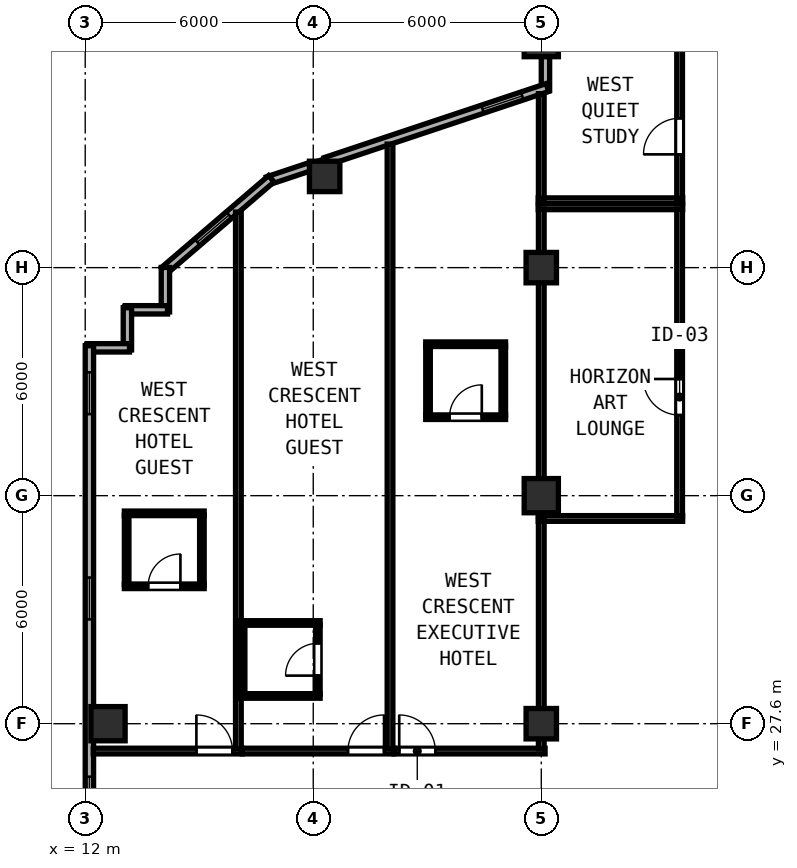
"""IFC4 building model, lengths in metres.
Left out: names, types, materials, properties, quantities, classifications, styles, units other than length and angle.
Written with IfcOpenShell. Run it as: python <this file> out.ifc"""

import sys

from ifc_helpers import new_model, si_unit, direction, frame, frame_2d, origin, origin_2d, place, context, subcontext, project, spatial, rectangle, hollow_rectangle, extrude, element, fill, save


model = new_model("IFC4")
c1 = context("Model", 3, precision=1e-05, world=origin(), true_north=direction((0.0, 1.0)))
c2 = subcontext(c1, "Body", "Model", "MODEL_VIEW")
j1 = project(units=[si_unit("LENGTHUNIT", "METRE"), si_unit("PLANEANGLEUNIT", "RADIAN")], contexts=[c1])
p1 = place(None, origin())
s1 = spatial("IfcSite", under=j1, at=p1, CompositionType="ELEMENT")
p2 = place(p1, origin())
s2 = spatial("IfcBuilding", under=s1, at=p2, CompositionType="ELEMENT")
p3 = place(p2, frame((0.0, 0.0, 215.4)))
s3 = spatial("IfcBuildingStorey", under=s2, at=p3, CompositionType="ELEMENT", Elevation=215.4)
for number, where, z_axis, x_axis in (
    (1, (24.0, 33.6, 0.0), (0.0, 0.0, 1.0), (1.0, 0.0, 0.0)),
    (2, (24.0, 45.6, 0.0), (0.0, 0.0, 1.0), (1.0, 0.0, 0.0)),
    (3, (12.6, 27.6, 0.0), (0.0, 0.0, 1.0), (1.0, 0.0, 0.0)),
):
    element("IfcColumn", number, at=place(p3, frame(where, z_axis=z_axis, x_axis=x_axis)), inside=s3, PredefinedType="COLUMN", context=c2, shape_type="SweptSolid", body=[
        extrude(hollow_rectangle(XDim=0.9, YDim=0.9, WallThickness=0.034, at=origin_2d()), origin(), (0.0, 0.0, 1.0), 3.8),
    ])
for number, where, z_axis, x_axis in (
    (4, (24.0, 27.6, 0.0), (0.0, 0.0, 1.0), (1.0, 0.0, 0.0)),
    (5, (24.0, 39.6, 0.0), (0.0, 0.0, 1.0), (1.0, 0.0, 0.0)),
    (6, (18.3, 42.0, 0.0), (0.0, 0.0, 1.0), (1.0, 0.0, 0.0)),
):
    element("IfcColumn", number, at=place(p3, frame(where, z_axis=z_axis, x_axis=x_axis)), inside=s3, PredefinedType="COLUMN", context=c2, shape_type="SweptSolid", body=[
        extrude(hollow_rectangle(XDim=0.8, YDim=0.8, WallThickness=0.03, at=origin_2d()), origin(), (0.0, 0.0, 1.0), 3.8),
    ])
p4 = place(p3, frame((24.11, 45.158, 0.0), z_axis=(0.0, 0.0, 1.0), x_axis=(0.0, -1.0, 0.0)))
e7 = element("IfcWall", 7, at=p4, inside=s3, PredefinedType="SOLIDWALL", context=c2, shape_type="SweptSolid", body=[
    extrude(rectangle(XDim=0.892, YDim=0.22, at=frame_2d((0.446, 0.0))), origin(), (0.0, 0.0, 1.0), 3.215),
])
p5 = place(p3, frame((24.162, 44.338, 0.0), z_axis=(0.0, 0.0, 1.0), x_axis=(-0.948687265055, -0.316215864755, 0.0)))
e8 = element("IfcWall", 8, at=p5, inside=s3, PredefinedType="SOLIDWALL", context=c2, shape_type="SweptSolid", body=[
    extrude(rectangle(XDim=6.154, YDim=0.22, at=frame_2d((3.077, 0.0))), origin(), (0.0, 0.0, 1.0), 3.215),
])
p6 = place(p5, frame((0.7, 0.0, 0.85)))
e9 = element("IfcOpeningElement", 9, at=p6, cuts=e8, PredefinedType="OPENING", context=c2, shape_type="SweptSolid", body=[
    extrude(rectangle(XDim=1.1, YDim=1.75, at=frame_2d((0.55, 0.875))), frame((0.0, 0.12, 0.0), z_axis=(0.0, -1.0, 0.0), x_axis=(1.0, 0.0, 0.0)), (0.0, 0.0, 1.0), 0.24),
])
p7 = place(p3, frame((17.908, 42.253, 0.0), z_axis=(0.0, 0.0, 1.0), x_axis=(-0.948662335685, -0.316290646166, 0.0)))
e10 = element("IfcWall", 10, at=p7, inside=s3, PredefinedType="SOLIDWALL", context=c2, shape_type="SweptSolid", body=[
    extrude(rectangle(XDim=1.165, YDim=0.22, at=frame_2d((0.583, 0.0))), origin(), (0.0, 0.0, 1.0), 3.62),
])
p8 = place(p3, frame((16.897, 41.938, 0.0), z_axis=(0.0, 0.0, 1.0), x_axis=(-0.759279729622, -0.650764390686, 0.0)))
e11 = element("IfcWall", 11, at=p8, inside=s3, PredefinedType="SOLIDWALL", context=c2, shape_type="SweptSolid", body=[
    extrude(rectangle(XDim=3.726, YDim=0.22, at=frame_2d((1.863, 0.0))), origin(), (0.0, 0.0, 1.0), 3.62),
])
p9 = place(p8, frame((1.464, 0.0, 0.85)))
e12 = element("IfcOpeningElement", 12, at=p9, cuts=e11, PredefinedType="OPENING", context=c2, shape_type="SweptSolid", body=[
    extrude(rectangle(XDim=1.1, YDim=1.75, at=frame_2d((0.55, 0.875))), frame((0.0, 0.12, 0.0), z_axis=(0.0, -1.0, 0.0), x_axis=(1.0, 0.0, 0.0)), (0.0, 0.0, 1.0), 0.24),
])
p10 = place(p3, frame((14.11, 39.604, 0.0), z_axis=(0.0, 0.0, 1.0), x_axis=(0.0, -1.0, 0.0)))
e13 = element("IfcWall", 13, at=p10, inside=s3, PredefinedType="SOLIDWALL", context=c2, shape_type="SweptSolid", body=[
    extrude(rectangle(XDim=1.169, YDim=0.22, at=frame_2d((0.585, 0.0))), origin(), (0.0, 0.0, 1.0), 3.62),
])
p11 = place(p3, frame((14.165, 38.49, 0.0), z_axis=(0.0, 0.0, 1.0), x_axis=(-1.0, 0.0, 0.0)))
e14 = element("IfcWall", 14, at=p11, inside=s3, PredefinedType="SOLIDWALL", context=c2, shape_type="SweptSolid", body=[
    extrude(rectangle(XDim=1.11, YDim=0.22, at=frame_2d((0.555, 0.0))), origin(), (0.0, 0.0, 1.0), 3.62),
])
p12 = place(p3, frame((13.11, 38.545, 0.0), z_axis=(0.0, 0.0, 1.0), x_axis=(0.0, -1.0, 0.0)))
e15 = element("IfcWall", 15, at=p12, inside=s3, PredefinedType="SOLIDWALL", context=c2, shape_type="SweptSolid", body=[
    extrude(rectangle(XDim=1.11, YDim=0.22, at=frame_2d((0.555, 0.0))), origin(), (0.0, 0.0, 1.0), 3.62),
])
p13 = place(p3, frame((13.165, 37.49, 0.0), z_axis=(0.0, 0.0, 1.0), x_axis=(-1.0, 0.0, 0.0)))
e16 = element("IfcWall", 16, at=p13, inside=s3, PredefinedType="SOLIDWALL", context=c2, shape_type="SweptSolid", body=[
    extrude(rectangle(XDim=1.11, YDim=0.22, at=frame_2d((0.555, 0.0))), origin(), (0.0, 0.0, 1.0), 3.62),
])
p14 = place(p3, frame((12.11, 37.545, 0.0), z_axis=(0.0, 0.0, 1.0), x_axis=(0.0, -1.0, 0.0)))
e17 = element("IfcWall", 17, at=p14, inside=s3, PredefinedType="SOLIDWALL", context=c2, shape_type="SweptSolid", body=[
    extrude(rectangle(XDim=21.145, YDim=0.22, at=frame_2d((10.573, 0.0))), origin(), (0.0, 0.0, 1.0), 3.62),
])
p15 = place(p14, frame((0.7, 0.0, 0.85)))
e18 = element("IfcOpeningElement", 18, at=p15, cuts=e17, PredefinedType="OPENING", context=c2, shape_type="SweptSolid", body=[
    extrude(rectangle(XDim=1.1, YDim=1.75, at=frame_2d((0.55, 0.875))), frame((0.0, 0.12, 0.0), z_axis=(0.0, -1.0, 0.0), x_axis=(1.0, 0.0, 0.0)), (0.0, 0.0, 1.0), 0.24),
])
p16 = place(p14, frame((6.1, 0.0, 0.85)))
e19 = element("IfcOpeningElement", 19, at=p16, cuts=e17, PredefinedType="OPENING", context=c2, shape_type="SweptSolid", body=[
    extrude(rectangle(XDim=1.1, YDim=1.75, at=frame_2d((0.55, 0.875))), frame((0.0, 0.12, 0.0), z_axis=(0.0, -1.0, 0.0), x_axis=(1.0, 0.0, 0.0)), (0.0, 0.0, 1.0), 0.24),
])
p17 = place(p14, frame((11.34, 0.0, 0.85)))
e20 = element("IfcOpeningElement", 20, at=p17, cuts=e17, PredefinedType="OPENING", context=c2, shape_type="SweptSolid", body=[
    extrude(rectangle(XDim=1.1, YDim=1.75, at=frame_2d((0.55, 0.875))), frame((0.0, 0.12, 0.0), z_axis=(0.0, -1.0, 0.0), x_axis=(1.0, 0.0, 0.0)), (0.0, 0.0, 1.0), 0.24),
])
p18 = place(p14, frame((16.9, 0.0, 0.85)))
e21 = element("IfcOpeningElement", 21, at=p18, cuts=e17, PredefinedType="OPENING", context=c2, shape_type="SweptSolid", body=[
    extrude(rectangle(XDim=1.1, YDim=1.75, at=frame_2d((0.55, 0.875))), frame((0.0, 0.12, 0.0), z_axis=(0.0, -1.0, 0.0), x_axis=(1.0, 0.0, 0.0)), (0.0, 0.0, 1.0), 0.24),
])
for number, where, z_axis, x_axis in (
    (22, (23.92, 41.2, 0.0), (0.0, 0.0, 1.0), (1.0, 0.0, 0.0)),
    (23, (23.92, 33.0, 0.0), (0.0, 0.0, 1.0), (1.0, 0.0, 0.0)),
):
    element("IfcWall", number, at=place(p3, frame(where, z_axis=z_axis, x_axis=x_axis)), inside=s3, PredefinedType="PARTITIONING", context=c2, shape_type="SweptSolid", body=[
        extrude(rectangle(XDim=3.8, YDim=0.15, at=frame_2d((1.9, 0.0))), origin(), (0.0, 0.0, 1.0), 3.62),
    ])
p19 = place(p3, frame((24.0, 33.06, 0.0), z_axis=(0.0, 0.0, 1.0), x_axis=(0.0, 1.0, 0.0)))
e24 = element("IfcWall", 24, at=p19, inside=s3, PredefinedType="PARTITIONING", context=c2, shape_type="SweptSolid", body=[
    extrude(rectangle(XDim=8.08, YDim=0.15, at=frame_2d((4.04, 0.0))), origin(), (0.0, 0.0, 1.0), 3.215),
])
p20 = place(p3, frame((27.64, 33.06, 0.0), z_axis=(0.0, 0.0, 1.0), x_axis=(0.0, 1.0, 0.0)))
e25 = element("IfcWall", 25, at=p20, inside=s3, PredefinedType="PARTITIONING", context=c2, shape_type="SweptSolid", body=[
    extrude(rectangle(XDim=8.08, YDim=0.15, at=frame_2d((4.04, 0.0))), origin(), (0.0, 0.0, 1.0), 3.62),
])
p21 = place(p20, frame((3.61, 0.0, 0.0), z_axis=(0.0, 0.0, 1.0), x_axis=(-1.0, 0.0, 0.0)))
e26 = element("IfcOpeningElement", 26, at=p21, cuts=e25, PredefinedType="OPENING", context=c2, shape_type="SweptSolid", body=[
    extrude(rectangle(XDim=0.95, YDim=2.12, at=frame_2d((0.475, 1.06))), frame((0.0, 0.085, 0.0), z_axis=(0.0, -1.0, 0.0), x_axis=(1.0, 0.0, 0.0)), (0.0, 0.0, 1.0), 0.17),
])
p22 = place(p3, frame((23.92, 41.36, 0.0), z_axis=(0.0, 0.0, 1.0), x_axis=(1.0, 0.0, 0.0)))
e27 = element("IfcWall", 27, at=p22, inside=s3, PredefinedType="PARTITIONING", context=c2, shape_type="SweptSolid", body=[
    extrude(rectangle(XDim=3.8, YDim=0.15, at=frame_2d((1.9, 0.0))), origin(), (0.0, 0.0, 1.0), 3.62),
])
p23 = place(p3, frame((24.0, 41.42, 0.0), z_axis=(0.0, 0.0, 1.0), x_axis=(0.0, 1.0, 0.0)))
e28 = element("IfcWall", 28, at=p23, inside=s3, PredefinedType="PARTITIONING", context=c2, shape_type="SweptSolid", body=[
    extrude(rectangle(XDim=2.757, YDim=0.15, at=frame_2d((1.378, 0.0))), origin(), (0.0, 0.0, 1.0), 3.215),
])
p24 = place(p3, frame((27.64, 41.42, 0.0), z_axis=(0.0, 0.0, 1.0), x_axis=(0.0, 1.0, 0.0)))
e29 = element("IfcWall", 29, at=p24, inside=s3, PredefinedType="PARTITIONING", context=c2, shape_type="SweptSolid", body=[
    extrude(rectangle(XDim=4.54, YDim=0.15, at=frame_2d((2.27, 0.0))), origin(), (0.0, 0.0, 1.0), 3.62),
])
p25 = place(p24, frame((2.11, 0.0, 0.0), z_axis=(0.0, 0.0, 1.0), x_axis=(-1.0, 0.0, 0.0)))
e30 = element("IfcOpeningElement", 30, at=p25, cuts=e29, PredefinedType="OPENING", context=c2, shape_type="SweptSolid", body=[
    extrude(rectangle(XDim=0.95, YDim=2.12, at=frame_2d((0.475, 1.06))), frame((0.0, 0.085, 0.0), z_axis=(0.0, -1.0, 0.0), x_axis=(1.0, 0.0, 0.0)), (0.0, 0.0, 1.0), 0.17),
])
p26 = place(p3, frame((12.212, 26.88, 0.0), z_axis=(0.0, 0.0, 1.0), x_axis=(1.0, 0.0, 0.0)))
e31 = element("IfcWall", 31, at=p26, inside=s3, PredefinedType="PARTITIONING", context=c2, shape_type="SweptSolid", body=[
    extrude(rectangle(XDim=3.918, YDim=0.15, at=frame_2d((1.959, 0.0))), origin(), (0.0, 0.0, 1.0), 3.62),
])
p27 = place(p26, frame((2.713, 0.0, 0.0)))
e32 = element("IfcOpeningElement", 32, at=p27, cuts=e31, PredefinedType="OPENING", context=c2, shape_type="SweptSolid", body=[
    extrude(rectangle(XDim=0.95, YDim=2.15, at=frame_2d((0.475, 1.075))), frame((0.0, 0.085, 0.0), z_axis=(0.0, -1.0, 0.0), x_axis=(1.0, 0.0, 0.0)), (0.0, 0.0, 1.0), 0.17),
])
p28 = place(p3, frame((16.03, 26.94, 0.0), z_axis=(0.0, 0.0, 1.0), x_axis=(0.0, 1.0, 0.0)))
e33 = element("IfcWall", 33, at=p28, inside=s3, PredefinedType="PARTITIONING", context=c2, shape_type="SweptSolid", body=[
    extrude(rectangle(XDim=14.121, YDim=0.15, at=frame_2d((7.061, 0.0))), origin(), (0.0, 0.0, 1.0), 3.62),
])
p29 = place(p3, frame((13.03, 33.135, 0.0), z_axis=(0.0, 0.0, 1.0), x_axis=(1.0, 0.0, 0.0)))
e34 = element("IfcWall", 34, at=p29, inside=s3, PredefinedType="PARTITIONING", context=c2, shape_type="SweptSolid", body=[
    extrude(rectangle(XDim=2.1, YDim=0.12, at=frame_2d((1.05, 0.0))), origin(), (0.0, 0.0, 1.0), 3.62),
])
p30 = place(p3, frame((13.03, 31.215, 0.0), z_axis=(0.0, 0.0, 1.0), x_axis=(1.0, 0.0, 0.0)))
e35 = element("IfcWall", 35, at=p30, inside=s3, PredefinedType="PARTITIONING", context=c2, shape_type="SweptSolid", body=[
    extrude(rectangle(XDim=2.1, YDim=0.12, at=frame_2d((1.05, 0.0))), origin(), (0.0, 0.0, 1.0), 3.62),
])
p31 = place(p30, frame((0.625, 0.0, 0.0)))
e36 = element("IfcOpeningElement", 36, at=p31, cuts=e35, PredefinedType="OPENING", context=c2, shape_type="SweptSolid", body=[
    extrude(rectangle(XDim=0.85, YDim=2.1, at=frame_2d((0.425, 1.05))), frame((0.0, 0.07, 0.0), z_axis=(0.0, -1.0, 0.0), x_axis=(1.0, 0.0, 0.0)), (0.0, 0.0, 1.0), 0.14),
])
for number, where, z_axis, x_axis in (
    (37, (13.09, 31.26, 0.0), (0.0, 0.0, 1.0), (0.0, 1.0, 0.0)),
    (38, (15.07, 31.26, 0.0), (0.0, 0.0, 1.0), (0.0, 1.0, 0.0)),
):
    element("IfcWall", number, at=place(p3, frame(where, z_axis=z_axis, x_axis=x_axis)), inside=s3, PredefinedType="PARTITIONING", context=c2, shape_type="SweptSolid", body=[
        extrude(rectangle(XDim=1.83, YDim=0.12, at=frame_2d((0.915, 0.0))), origin(), (0.0, 0.0, 1.0), 3.62),
    ])
p32 = place(p3, frame((16.132, 26.88, 0.0), z_axis=(0.0, 0.0, 1.0), x_axis=(1.0, 0.0, 0.0)))
e39 = element("IfcWall", 39, at=p32, inside=s3, PredefinedType="PARTITIONING", context=c2, shape_type="SweptSolid", body=[
    extrude(rectangle(XDim=3.988, YDim=0.15, at=frame_2d((1.994, 0.0))), origin(), (0.0, 0.0, 1.0), 3.62),
])
p33 = place(p32, frame((2.781, 0.0, 0.0)))
e40 = element("IfcOpeningElement", 40, at=p33, cuts=e39, PredefinedType="OPENING", context=c2, shape_type="SweptSolid", body=[
    extrude(rectangle(XDim=0.95, YDim=2.15, at=frame_2d((0.475, 1.075))), frame((0.0, 0.085, 0.0), z_axis=(0.0, -1.0, 0.0), x_axis=(1.0, 0.0, 0.0)), (0.0, 0.0, 1.0), 0.17),
])
p34 = place(p3, frame((20.02, 26.94, 0.0), z_axis=(0.0, 0.0, 1.0), x_axis=(0.0, 1.0, 0.0)))
e41 = element("IfcWall", 41, at=p34, inside=s3, PredefinedType="PARTITIONING", context=c2, shape_type="SweptSolid", body=[
    extrude(rectangle(XDim=15.91, YDim=0.15, at=frame_2d((7.955, 0.0))), origin(), (0.0, 0.0, 1.0), 3.62),
])
for number, where, z_axis, x_axis in (
    (42, (16.09, 30.25, 0.0), (0.0, 0.0, 1.0), (1.0, 0.0, 0.0)),
    (43, (16.09, 28.33, 0.0), (0.0, 0.0, 1.0), (1.0, 0.0, 0.0)),
):
    element("IfcWall", number, at=place(p3, frame(where, z_axis=z_axis, x_axis=x_axis)), inside=s3, PredefinedType="PARTITIONING", context=c2, shape_type="SweptSolid", body=[
        extrude(rectangle(XDim=2.091, YDim=0.12, at=frame_2d((1.046, 0.0))), origin(), (0.0, 0.0, 1.0), 3.62),
    ])
p35 = place(p3, frame((16.141, 28.375, 0.0), z_axis=(0.0, 0.0, 1.0), x_axis=(0.0, 1.0, 0.0)))
e44 = element("IfcWall", 44, at=p35, inside=s3, PredefinedType="PARTITIONING", context=c2, shape_type="SweptSolid", body=[
    extrude(rectangle(XDim=1.83, YDim=0.12, at=frame_2d((0.915, 0.0))), origin(), (0.0, 0.0, 1.0), 3.62),
])
p36 = place(p3, frame((18.121, 28.375, 0.0), z_axis=(0.0, 0.0, 1.0), x_axis=(0.0, 1.0, 0.0)))
e45 = element("IfcWall", 45, at=p36, inside=s3, PredefinedType="PARTITIONING", context=c2, shape_type="SweptSolid", body=[
    extrude(rectangle(XDim=1.83, YDim=0.12, at=frame_2d((0.915, 0.0))), origin(), (0.0, 0.0, 1.0), 3.62),
])
p37 = place(p36, frame((0.49, 0.0, 0.0)))
e46 = element("IfcOpeningElement", 46, at=p37, cuts=e45, PredefinedType="OPENING", context=c2, shape_type="SweptSolid", body=[
    extrude(rectangle(XDim=0.85, YDim=2.1, at=frame_2d((0.425, 1.05))), frame((0.0, 0.07, 0.0), z_axis=(0.0, -1.0, 0.0), x_axis=(1.0, 0.0, 0.0)), (0.0, 0.0, 1.0), 0.14),
])
p38 = place(p3, frame((20.122, 26.88, 0.0), z_axis=(0.0, 0.0, 1.0), x_axis=(1.0, 0.0, 0.0)))
e47 = element("IfcWall", 47, at=p38, inside=s3, PredefinedType="PARTITIONING", context=c2, shape_type="SweptSolid", body=[
    extrude(rectangle(XDim=3.978, YDim=0.15, at=frame_2d((1.989, 0.0))), origin(), (0.0, 0.0, 1.0), 3.62),
])
p39 = place(p38, frame((0.14, 0.0, 0.0)))
e48 = element("IfcOpeningElement", 48, at=p39, cuts=e47, PredefinedType="OPENING", context=c2, shape_type="SweptSolid", body=[
    extrude(rectangle(XDim=0.95, YDim=2.18, at=frame_2d((0.475, 1.09))), frame((0.0, 0.085, 0.0), z_axis=(0.0, -1.0, 0.0), x_axis=(1.0, 0.0, 0.0)), (0.0, 0.0, 1.0), 0.17),
])
p40 = place(p3, frame((24.0, 26.94, 0.0), z_axis=(0.0, 0.0, 1.0), x_axis=(0.0, 1.0, 0.0)))
e49 = element("IfcWall", 49, at=p40, inside=s3, PredefinedType="PARTITIONING", context=c2, shape_type="SweptSolid", body=[
    extrude(rectangle(XDim=6.0, YDim=0.15, at=frame_2d((3.0, 0.0))), origin(), (0.0, 0.0, 1.0), 3.215),
])
p41 = place(p3, frame((20.96, 37.585, 0.0), z_axis=(0.0, 0.0, 1.0), x_axis=(1.0, 0.0, 0.0)))
e50 = element("IfcWall", 50, at=p41, inside=s3, PredefinedType="PARTITIONING", context=c2, shape_type="SweptSolid", body=[
    extrude(rectangle(XDim=2.1, YDim=0.12, at=frame_2d((1.05, 0.0))), origin(), (0.0, 0.0, 1.0), 3.62),
])
p42 = place(p3, frame((20.96, 35.665, 0.0), z_axis=(0.0, 0.0, 1.0), x_axis=(1.0, 0.0, 0.0)))
e51 = element("IfcWall", 51, at=p42, inside=s3, PredefinedType="PARTITIONING", context=c2, shape_type="SweptSolid", body=[
    extrude(rectangle(XDim=2.1, YDim=0.12, at=frame_2d((1.05, 0.0))), origin(), (0.0, 0.0, 1.0), 3.62),
])
p43 = place(p42, frame((0.625, 0.0, 0.0)))
e52 = element("IfcOpeningElement", 52, at=p43, cuts=e51, PredefinedType="OPENING", context=c2, shape_type="SweptSolid", body=[
    extrude(rectangle(XDim=0.85, YDim=2.1, at=frame_2d((0.425, 1.05))), frame((0.0, 0.07, 0.0), z_axis=(0.0, -1.0, 0.0), x_axis=(1.0, 0.0, 0.0)), (0.0, 0.0, 1.0), 0.14),
])
for number, where, z_axis, x_axis in (
    (53, (21.02, 35.71, 0.0), (0.0, 0.0, 1.0), (0.0, 1.0, 0.0)),
    (54, (23.0, 35.71, 0.0), (0.0, 0.0, 1.0), (0.0, 1.0, 0.0)),
):
    element("IfcWall", number, at=place(p3, frame(where, z_axis=z_axis, x_axis=x_axis)), inside=s3, PredefinedType="PARTITIONING", context=c2, shape_type="SweptSolid", body=[
        extrude(rectangle(XDim=1.83, YDim=0.12, at=frame_2d((0.915, 0.0))), origin(), (0.0, 0.0, 1.0), 3.62),
    ])
p44 = place(p6, origin())
e55 = element("IfcWindow", 55, at=p44, inside=s3, PartitioningType="SINGLE_PANEL", PredefinedType="WINDOW", context=c2, shape_type="SweptSolid", body=[
    extrude(rectangle(XDim=1.1, YDim=1.75, at=frame_2d((0.55, 0.875))), frame((0.0, 0.03, 0.0), z_axis=(0.0, -1.0, 0.0), x_axis=(1.0, 0.0, 0.0)), (0.0, 0.0, 1.0), 0.06),
])
fill(e9, e55)
p45 = place(p9, origin())
e56 = element("IfcWindow", 56, at=p45, inside=s3, PartitioningType="SINGLE_PANEL", PredefinedType="WINDOW", context=c2, shape_type="SweptSolid", body=[
    extrude(rectangle(XDim=1.1, YDim=1.75, at=frame_2d((0.55, 0.875))), frame((0.0, 0.03, 0.0), z_axis=(0.0, -1.0, 0.0), x_axis=(1.0, 0.0, 0.0)), (0.0, 0.0, 1.0), 0.06),
])
fill(e12, e56)
p46 = place(p15, origin())
e57 = element("IfcWindow", 57, at=p46, inside=s3, PartitioningType="SINGLE_PANEL", PredefinedType="WINDOW", context=c2, shape_type="SweptSolid", body=[
    extrude(rectangle(XDim=1.1, YDim=1.75, at=frame_2d((0.55, 0.875))), frame((0.0, 0.03, 0.0), z_axis=(0.0, -1.0, 0.0), x_axis=(1.0, 0.0, 0.0)), (0.0, 0.0, 1.0), 0.06),
])
fill(e18, e57)
p47 = place(p16, origin())
e58 = element("IfcWindow", 58, at=p47, inside=s3, PartitioningType="SINGLE_PANEL", PredefinedType="WINDOW", context=c2, shape_type="SweptSolid", body=[
    extrude(rectangle(XDim=1.1, YDim=1.75, at=frame_2d((0.55, 0.875))), frame((0.0, 0.03, 0.0), z_axis=(0.0, -1.0, 0.0), x_axis=(1.0, 0.0, 0.0)), (0.0, 0.0, 1.0), 0.06),
])
fill(e19, e58)
p48 = place(p17, origin())
e59 = element("IfcWindow", 59, at=p48, inside=s3, PartitioningType="SINGLE_PANEL", PredefinedType="WINDOW", context=c2, shape_type="SweptSolid", body=[
    extrude(rectangle(XDim=1.1, YDim=1.75, at=frame_2d((0.55, 0.875))), frame((0.0, 0.03, 0.0), z_axis=(0.0, -1.0, 0.0), x_axis=(1.0, 0.0, 0.0)), (0.0, 0.0, 1.0), 0.06),
])
fill(e20, e59)
p49 = place(p21, origin())
e60 = element("IfcDoor", 60, at=p49, inside=s3, OperationType="SINGLE_SWING_LEFT", PredefinedType="DOOR", context=c2, shape_type="SweptSolid", body=[
    extrude(rectangle(XDim=0.95, YDim=2.12, at=frame_2d((0.475, 1.06))), frame((0.0, 0.025, 0.0), z_axis=(0.0, -1.0, 0.0), x_axis=(1.0, 0.0, 0.0)), (0.0, 0.0, 1.0), 0.05),
])
fill(e26, e60)
p50 = place(p25, origin())
e61 = element("IfcDoor", 61, at=p50, inside=s3, OperationType="SINGLE_SWING_RIGHT", PredefinedType="DOOR", context=c2, shape_type="SweptSolid", body=[
    extrude(rectangle(XDim=0.95, YDim=2.12, at=frame_2d((0.475, 1.06))), frame((0.0, 0.025, 0.0), z_axis=(0.0, -1.0, 0.0), x_axis=(1.0, 0.0, 0.0)), (0.0, 0.0, 1.0), 0.05),
])
fill(e30, e61)
p51 = place(p27, origin())
e62 = element("IfcDoor", 62, at=p51, inside=s3, OperationType="SINGLE_SWING_LEFT", PredefinedType="DOOR", context=c2, shape_type="SweptSolid", body=[
    extrude(rectangle(XDim=0.95, YDim=2.15, at=frame_2d((0.475, 1.075))), frame((0.0, 0.025, 0.0), z_axis=(0.0, -1.0, 0.0), x_axis=(1.0, 0.0, 0.0)), (0.0, 0.0, 1.0), 0.05),
])
fill(e32, e62)
p52 = place(p31, origin())
e63 = element("IfcDoor", 63, at=p52, inside=s3, OperationType="SINGLE_SWING_RIGHT", PredefinedType="DOOR", context=c2, shape_type="SweptSolid", body=[
    extrude(rectangle(XDim=0.85, YDim=2.1, at=frame_2d((0.425, 1.05))), frame((0.0, 0.025, 0.0), z_axis=(0.0, -1.0, 0.0), x_axis=(1.0, 0.0, 0.0)), (0.0, 0.0, 1.0), 0.05),
])
fill(e36, e63)
p53 = place(p33, origin())
e64 = element("IfcDoor", 64, at=p53, inside=s3, OperationType="SINGLE_SWING_RIGHT", PredefinedType="DOOR", context=c2, shape_type="SweptSolid", body=[
    extrude(rectangle(XDim=0.95, YDim=2.15, at=frame_2d((0.475, 1.075))), frame((0.0, 0.025, 0.0), z_axis=(0.0, -1.0, 0.0), x_axis=(1.0, 0.0, 0.0)), (0.0, 0.0, 1.0), 0.05),
])
fill(e40, e64)
p54 = place(p37, origin())
e65 = element("IfcDoor", 65, at=p54, inside=s3, OperationType="SINGLE_SWING_LEFT", PredefinedType="DOOR", context=c2, shape_type="SweptSolid", body=[
    extrude(rectangle(XDim=0.85, YDim=2.1, at=frame_2d((0.425, 1.05))), frame((0.0, 0.025, 0.0), z_axis=(0.0, -1.0, 0.0), x_axis=(1.0, 0.0, 0.0)), (0.0, 0.0, 1.0), 0.05),
])
fill(e46, e65)
p55 = place(p39, origin())
e66 = element("IfcDoor", 66, at=p55, inside=s3, OperationType="SINGLE_SWING_LEFT", PredefinedType="DOOR", context=c2, shape_type="SweptSolid", body=[
    extrude(rectangle(XDim=0.95, YDim=2.18, at=frame_2d((0.475, 1.09))), frame((0.0, 0.025, 0.0), z_axis=(0.0, -1.0, 0.0), x_axis=(1.0, 0.0, 0.0)), (0.0, 0.0, 1.0), 0.05),
])
fill(e48, e66)
p56 = place(p43, origin())
e67 = element("IfcDoor", 67, at=p56, inside=s3, OperationType="SINGLE_SWING_RIGHT", PredefinedType="DOOR", context=c2, shape_type="SweptSolid", body=[
    extrude(rectangle(XDim=0.85, YDim=2.1, at=frame_2d((0.425, 1.05))), frame((0.0, 0.025, 0.0), z_axis=(0.0, -1.0, 0.0), x_axis=(1.0, 0.0, 0.0)), (0.0, 0.0, 1.0), 0.05),
])
fill(e52, e67)
save(model, sys.argv[1])
